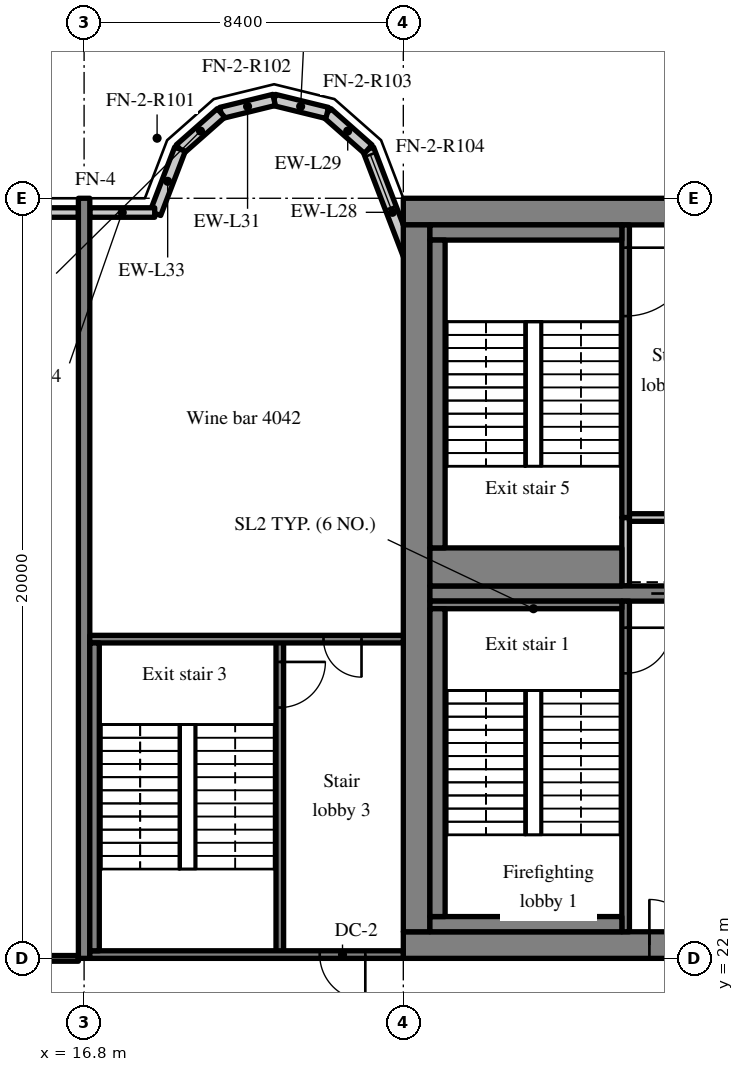
"""IFC4 building model, lengths in metres.
Left out: names, types, materials, properties, quantities, classifications, styles, units other than length and angle.
Written with IfcOpenShell. Run it as: python <this file> out.ifc"""

import sys

from ifc_helpers import new_model, si_unit, direction, frame, frame_2d, origin, place, context, subcontext, project, spatial, rectangle, extrude, source, transform, mapped, element, fill, save


model = new_model("IFC4")
c1 = context("Model", 3, precision=1e-05, world=origin(), true_north=direction((0.0, 1.0)))
c2 = subcontext(c1, "Body", "Model", "MODEL_VIEW")
j1 = project(units=[si_unit("LENGTHUNIT", "METRE"), si_unit("PLANEANGLEUNIT", "RADIAN")], contexts=[c1])
p1 = place(None, origin())
s1 = spatial("IfcSite", under=j1, at=p1, CompositionType="ELEMENT")
p2 = place(p1, origin())
s2 = spatial("IfcBuilding", under=s1, at=p2, CompositionType="ELEMENT")
p3 = place(p2, frame((0.0, 0.0, 166.8)))
s3 = spatial("IfcBuildingStorey", under=s2, at=p3, CompositionType="ELEMENT", Elevation=166.8)
m1 = source(origin(), c2, "Body", "SweptSolid", [
    extrude(rectangle(XDim=50.4, YDim=0.7, at=frame_2d((25.2, 0.0))), origin(), (0.0, 0.0, 1.0), 3.52),
])
p4 = place(p3, frame((25.2, 22.35, 0.0), z_axis=(0.0, 0.0, 1.0), x_axis=(1.0, 0.0, 0.0)))
e1 = element("IfcWall", 1, at=p4, inside=s3, PredefinedType="SHEAR", context=c2, shape_type="MappedRepresentation", body=[
    mapped(m1, transform((0.0, 0.0, 0.0), scale=1.0)),
])
m2 = source(origin(), c2, "Body", "SweptSolid", [
    extrude(rectangle(XDim=1.8, YDim=2.1, at=frame_2d((0.9, 1.05))), frame((0.0, 0.36, 0.0), z_axis=(0.0, -1.0, 0.0), x_axis=(1.0, 0.0, 0.0)), (0.0, 0.0, 1.0), 0.72),
])
p5 = place(p4, frame((15.9, 0.0, 0.0)))
e2 = element("IfcOpeningElement", 2, at=p5, cuts=e1, PredefinedType="OPENING", context=c2, shape_type="MappedRepresentation", body=[
    mapped(m2, transform((0.0, 0.0, 0.0), scale=1.0)),
])
m3 = source(origin(), c2, "Body", "SweptSolid", [
    extrude(rectangle(XDim=0.9, YDim=2.1, at=frame_2d((0.45, 1.05))), frame((0.0, 0.36, 0.0), z_axis=(0.0, -1.0, 0.0), x_axis=(1.0, 0.0, 0.0)), (0.0, 0.0, 1.0), 0.72),
])
p6 = place(p4, frame((9.7, 0.0, 0.0)))
e3 = element("IfcOpeningElement", 3, at=p6, cuts=e1, PredefinedType="OPENING", context=c2, shape_type="MappedRepresentation", body=[
    mapped(m3, transform((0.0, 0.0, 0.0), scale=1.0)),
])
p7 = place(p4, frame((21.5, 0.0, 0.0)))
e4 = element("IfcOpeningElement", 4, at=p7, cuts=e1, PredefinedType="OPENING", context=c2, shape_type="MappedRepresentation", body=[
    mapped(m3, transform((0.0, 0.0, 0.0), scale=1.0)),
])
p8 = place(p4, frame((32.7, 0.0, 0.0)))
e5 = element("IfcOpeningElement", 5, at=p8, cuts=e1, PredefinedType="OPENING", context=c2, shape_type="MappedRepresentation", body=[
    mapped(m2, transform((0.0, 0.0, 0.0), scale=1.0)),
])
m4 = source(origin(), c2, "Body", "SweptSolid", [
    extrude(rectangle(XDim=1.2, YDim=2.1, at=frame_2d((0.6, 1.05))), frame((0.0, 0.36, 0.0), z_axis=(0.0, -1.0, 0.0), x_axis=(1.0, 0.0, 0.0)), (0.0, 0.0, 1.0), 0.72),
])
p9 = place(p4, frame((6.475, 0.0, 0.0)))
e6 = element("IfcOpeningElement", 6, at=p9, cuts=e1, PredefinedType="OPENING", context=c2, shape_type="MappedRepresentation", body=[
    mapped(m4, transform((0.0, 0.0, 0.0), scale=1.0)),
])
p10 = place(p4, frame((47.875, 0.0, 0.0)))
e7 = element("IfcOpeningElement", 7, at=p10, cuts=e1, PredefinedType="OPENING", context=c2, shape_type="MappedRepresentation", body=[
    mapped(m4, transform((0.0, 0.0, 0.0), scale=1.0)),
])
p11 = place(p3, frame((25.2, 41.65, 0.0), z_axis=(0.0, 0.0, 1.0), x_axis=(1.0, 0.0, 0.0)))
e8 = element("IfcWall", 8, at=p11, inside=s3, PredefinedType="SHEAR", context=c2, shape_type="MappedRepresentation", body=[
    mapped(m1, transform((0.0, 0.0, 0.0), scale=1.0)),
])
m5 = source(origin(), c2, "Body", "SweptSolid", [
    extrude(rectangle(XDim=18.6, YDim=0.7, at=frame_2d((9.3, 0.0))), origin(), (0.0, 0.0, 1.0), 3.52),
])
p12 = place(p3, frame((25.55, 22.7, 0.0), z_axis=(0.0, 0.0, 1.0), x_axis=(0.0, 1.0, 0.0)))
e9 = element("IfcWall", 9, at=p12, inside=s3, PredefinedType="SHEAR", context=c2, shape_type="MappedRepresentation", body=[
    mapped(m5, transform((0.0, 0.0, 0.0), scale=1.0)),
])
m6 = source(origin(), c2, "Body", "SweptSolid", [
    extrude(rectangle(XDim=7.5, YDim=0.4, at=frame_2d((3.75, 0.0))), origin(), (0.0, 0.0, 1.0), 3.52),
])
p13 = place(p3, frame((25.9, 31.6, 0.0), z_axis=(0.0, 0.0, 1.0), x_axis=(1.0, 0.0, 0.0)))
e10 = element("IfcWall", 10, at=p13, inside=s3, PredefinedType="SHEAR", context=c2, shape_type="MappedRepresentation", body=[
    mapped(m6, transform((0.0, 0.0, 0.0), scale=1.0)),
])
m7 = source(origin(), c2, "Body", "SweptSolid", [
    extrude(rectangle(XDim=1.1, YDim=2.1, at=frame_2d((0.55, 1.05))), frame((0.0, 0.21, 0.0), z_axis=(0.0, -1.0, 0.0), x_axis=(1.0, 0.0, 0.0)), (0.0, 0.0, 1.0), 0.42),
])
p14 = place(p13, frame((5.825, 0.0, 0.0)))
e11 = element("IfcOpeningElement", 11, at=p14, cuts=e10, PredefinedType="OPENING", context=c2, shape_type="MappedRepresentation", body=[
    mapped(m7, transform((0.0, 0.0, 0.0), scale=1.0)),
])
m8 = source(origin(), c2, "Body", "SweptSolid", [
    extrude(rectangle(XDim=20.0, YDim=0.3, at=frame_2d((10.0, 0.0))), origin(), (0.0, 0.0, 1.0), 3.52),
])
p15 = place(p3, frame((16.8, 22.0, 0.0), z_axis=(0.0, 0.0, 1.0), x_axis=(0.0, 1.0, 0.0)))
e12 = element("IfcWall", 12, at=p15, inside=s3, PredefinedType="SHEAR", context=c2, shape_type="MappedRepresentation", body=[
    mapped(m8, transform((0.0, 0.0, 0.0), scale=1.0)),
])
m9 = source(origin(), c2, "Body", "SweptSolid", [
    extrude(rectangle(XDim=3.559, YDim=0.3, at=frame_2d((1.78, 0.0))), origin(), (0.0, 0.0, 1.0), 3.52),
])
p16 = place(p3, frame((25.55, 39.969, 0.0), z_axis=(0.0, 0.0, 1.0), x_axis=(-0.35779745313, 0.933799219604, 0.0)))
e13 = element("IfcWall", 13, at=p16, inside=s3, PredefinedType="SOLIDWALL", context=c2, shape_type="MappedRepresentation", body=[
    mapped(m9, transform((0.0, 0.0, 0.0), scale=1.0)),
])
m10 = source(origin(), c2, "Body", "SweptSolid", [
    extrude(rectangle(XDim=1.5, YDim=2.0, at=frame_2d((0.75, 1.0))), frame((0.0, 0.16, 0.0), z_axis=(0.0, -1.0, 0.0), x_axis=(1.0, 0.0, 0.0)), (0.0, 0.0, 1.0), 0.32),
])
p17 = place(p16, frame((1.903, 0.0, 0.9)))
e14 = element("IfcOpeningElement", 14, at=p17, cuts=e13, PredefinedType="OPENING", context=c2, shape_type="MappedRepresentation", body=[
    mapped(m10, transform((0.0, 0.0, 0.0), scale=1.0)),
])
m11 = source(origin(), c2, "Body", "SweptSolid", [
    extrude(rectangle(XDim=1.44, YDim=0.3, at=frame_2d((0.72, 0.0))), origin(), (0.0, 0.0, 1.0), 3.52),
])
p18 = place(p3, frame((24.277, 43.292, 0.0), z_axis=(0.0, 0.0, 1.0), x_axis=(-0.749649827867, 0.661834673902, 0.0)))
e15 = element("IfcWall", 15, at=p18, inside=s3, PredefinedType="SOLIDWALL", context=c2, shape_type="MappedRepresentation", body=[
    mapped(m11, transform((0.0, 0.0, 0.0), scale=1.0)),
])
m12 = source(origin(), c2, "Body", "SweptSolid", [
    extrude(rectangle(XDim=1.438, YDim=0.3, at=frame_2d((0.719, 0.0))), origin(), (0.0, 0.0, 1.0), 3.52),
])
p19 = place(p3, frame((23.197, 44.245, 0.0), z_axis=(0.0, 0.0, 1.0), x_axis=(-0.971152283879, 0.238460146601, 0.0)))
e16 = element("IfcWall", 16, at=p19, inside=s3, PredefinedType="SOLIDWALL", context=c2, shape_type="MappedRepresentation", body=[
    mapped(m12, transform((0.0, 0.0, 0.0), scale=1.0)),
])
m13 = source(origin(), c2, "Body", "SweptSolid", [
    extrude(rectangle(XDim=1.439, YDim=0.3, at=frame_2d((0.719, 0.0))), origin(), (0.0, 0.0, 1.0), 3.52),
])
p20 = place(p3, frame((21.8, 44.588, 0.0), z_axis=(0.0, 0.0, 1.0), x_axis=(-0.971161932466, -0.238420848351, 0.0)))
e17 = element("IfcWall", 17, at=p20, inside=s3, PredefinedType="SOLIDWALL", context=c2, shape_type="MappedRepresentation", body=[
    mapped(m13, transform((0.0, 0.0, 0.0), scale=1.0)),
])
m14 = source(origin(), c2, "Body", "SweptSolid", [
    extrude(rectangle(XDim=1.44, YDim=0.3, at=frame_2d((0.72, 0.0))), origin(), (0.0, 0.0, 1.0), 3.52),
])
p21 = place(p3, frame((20.403, 44.245, 0.0), z_axis=(0.0, 0.0, 1.0), x_axis=(-0.74957555648, -0.661918790432, 0.0)))
e18 = element("IfcWall", 18, at=p21, inside=s3, PredefinedType="SOLIDWALL", context=c2, shape_type="MappedRepresentation", body=[
    mapped(m14, transform((0.0, 0.0, 0.0), scale=1.0)),
])
m15 = source(origin(), c2, "Body", "SweptSolid", [
    extrude(rectangle(XDim=1.812, YDim=0.3, at=frame_2d((0.906, 0.0))), origin(), (0.0, 0.0, 1.0), 3.52),
])
p22 = place(p3, frame((19.323, 43.292, 0.0), z_axis=(0.0, 0.0, 1.0), x_axis=(-0.357877270961, -0.93376863244, 0.0)))
e19 = element("IfcWall", 19, at=p22, inside=s3, PredefinedType="SOLIDWALL", context=c2, shape_type="MappedRepresentation", body=[
    mapped(m15, transform((0.0, 0.0, 0.0), scale=1.0)),
])
m16 = source(origin(), c2, "Body", "SweptSolid", [
    extrude(rectangle(XDim=4.094, YDim=0.25, at=frame_2d((2.047, 0.0))), origin(), (0.0, 0.0, 1.0), 2.87),
])
p23 = place(p3, frame((16.65, 41.625, 0.0), z_axis=(0.0, 0.0, 1.0), x_axis=(-1.0, 0.0, 0.0)))
e20 = element("IfcWall", 20, at=p23, inside=s3, PredefinedType="SOLIDWALL", context=c2, shape_type="MappedRepresentation", body=[
    mapped(m16, transform((0.0, 0.0, 0.0), scale=1.0)),
])
m17 = source(origin(), c2, "Body", "SweptSolid", [
    extrude(rectangle(XDim=1.5, YDim=1.5, at=frame_2d((0.75, 0.75))), frame((0.0, 0.135, 0.0), z_axis=(0.0, -1.0, 0.0), x_axis=(1.0, 0.0, 0.0)), (0.0, 0.0, 1.0), 0.27),
])
p24 = place(p23, frame((1.297, 0.0, 0.9)))
e21 = element("IfcOpeningElement", 21, at=p24, cuts=e20, PredefinedType="OPENING", context=c2, shape_type="MappedRepresentation", body=[
    mapped(m17, transform((0.0, 0.0, 0.0), scale=1.0)),
])
m18 = source(origin(), c2, "Body", "SweptSolid", [
    extrude(rectangle(XDim=1.708, YDim=0.25, at=frame_2d((0.854, 0.0))), origin(), (0.0, 0.0, 1.0), 2.87),
])
p25 = place(p3, frame((18.658, 41.625, 0.0), z_axis=(0.0, 0.0, 1.0), x_axis=(-1.0, 0.0, 0.0)))
e22 = element("IfcWall", 22, at=p25, inside=s3, PredefinedType="SOLIDWALL", context=c2, shape_type="MappedRepresentation", body=[
    mapped(m18, transform((0.0, 0.0, 0.0), scale=1.0)),
])
m19 = source(origin(), c2, "Body", "SweptSolid", [
    extrude(rectangle(XDim=8.7, YDim=0.2, at=frame_2d((4.35, 0.0))), origin(), (0.0, 0.0, 1.0), 3.52),
])
p26 = place(p3, frame((31.05, 22.7, 0.0), z_axis=(0.0, 0.0, 1.0), x_axis=(0.0, 1.0, 0.0)))
e23 = element("IfcWall", 23, at=p26, inside=s3, PredefinedType="SOLIDWALL", context=c2, shape_type="MappedRepresentation", body=[
    mapped(m19, transform((0.0, 0.0, 0.0), scale=1.0)),
])
m20 = source(origin(), c2, "Body", "SweptSolid", [
    extrude(rectangle(XDim=1.2, YDim=2.1, at=frame_2d((0.6, 1.05))), frame((0.0, 0.11, 0.0), z_axis=(0.0, -1.0, 0.0), x_axis=(1.0, 0.0, 0.0)), (0.0, 0.0, 1.0), 0.22),
])
p27 = place(p26, frame((6.8, 0.0, 0.0)))
e24 = element("IfcOpeningElement", 24, at=p27, cuts=e23, PredefinedType="OPENING", context=c2, shape_type="MappedRepresentation", body=[
    mapped(m20, transform((0.0, 0.0, 0.0), scale=1.0)),
])
m21 = source(origin(), c2, "Body", "SweptSolid", [
    extrude(rectangle(XDim=1.8, YDim=0.2, at=frame_2d((0.9, 0.0))), origin(), (0.0, 0.0, 1.0), 3.52),
])
p28 = place(p3, frame((31.05, 31.8, 0.0), z_axis=(0.0, 0.0, 1.0), x_axis=(0.0, 1.0, 0.0)))
e25 = element("IfcWall", 25, at=p28, inside=s3, PredefinedType="SOLIDWALL", context=c2, shape_type="MappedRepresentation", body=[
    mapped(m21, transform((0.0, 0.0, 0.0), scale=1.0)),
])
m22 = source(origin(), c2, "Body", "SweptSolid", [
    extrude(rectangle(XDim=2.25, YDim=0.2, at=frame_2d((1.125, 0.0))), origin(), (0.0, 0.0, 1.0), 3.52),
])
p29 = place(p3, frame((31.15, 33.6, 0.0), z_axis=(0.0, 0.0, 1.0), x_axis=(1.0, 0.0, 0.0)))
e26 = element("IfcWall", 26, at=p29, inside=s3, PredefinedType="SOLIDWALL", context=c2, shape_type="MappedRepresentation", body=[
    mapped(m22, transform((0.0, 0.0, 0.0), scale=1.0)),
])
m23 = source(origin(), c2, "Body", "SweptSolid", [
    extrude(rectangle(XDim=7.7, YDim=0.2, at=frame_2d((3.85, 0.0))), origin(), (0.0, 0.0, 1.0), 3.52),
])
p30 = place(p3, frame((31.05, 33.6, 0.0), z_axis=(0.0, 0.0, 1.0), x_axis=(0.0, 1.0, 0.0)))
e27 = element("IfcWall", 27, at=p30, inside=s3, PredefinedType="SOLIDWALL", context=c2, shape_type="MappedRepresentation", body=[
    mapped(m23, transform((0.0, 0.0, 0.0), scale=1.0)),
])
m24 = source(origin(), c2, "Body", "SweptSolid", [
    extrude(rectangle(XDim=1.8, YDim=2.1, at=frame_2d((0.9, 1.05))), frame((0.0, 0.11, 0.0), z_axis=(0.0, -1.0, 0.0), x_axis=(1.0, 0.0, 0.0)), (0.0, 0.0, 1.0), 0.22),
])
p31 = place(p30, frame((5.3, 0.0, 0.0)))
e28 = element("IfcOpeningElement", 28, at=p31, cuts=e27, PredefinedType="OPENING", context=c2, shape_type="MappedRepresentation", body=[
    mapped(m24, transform((0.0, 0.0, 0.0), scale=1.0)),
])
m25 = source(origin(), c2, "Body", "SweptSolid", [
    extrude(rectangle(XDim=8.3, YDim=0.2, at=frame_2d((4.15, 0.0))), origin(), (0.0, 0.0, 1.0), 3.52),
])
p32 = place(p3, frame((21.95, 22.1, 0.0), z_axis=(0.0, 0.0, 1.0), x_axis=(0.0, 1.0, 0.0)))
e29 = element("IfcWall", 29, at=p32, inside=s3, PredefinedType="SOLIDWALL", context=c2, shape_type="MappedRepresentation", body=[
    mapped(m25, transform((0.0, 0.0, 0.0), scale=1.0)),
])
p33 = place(p32, frame((6.5, 0.0, 0.0)))
e30 = element("IfcOpeningElement", 30, at=p33, cuts=e29, PredefinedType="OPENING", context=c2, shape_type="MappedRepresentation", body=[
    mapped(m20, transform((0.0, 0.0, 0.0), scale=1.0)),
])
m26 = source(origin(), c2, "Body", "SweptSolid", [
    extrude(rectangle(XDim=8.25, YDim=0.2, at=frame_2d((4.125, 0.0))), origin(), (0.0, 0.0, 1.0), 3.52),
])
p34 = place(p3, frame((16.95, 22.1, 0.0), z_axis=(0.0, 0.0, 1.0), x_axis=(1.0, 0.0, 0.0)))
e31 = element("IfcWall", 31, at=p34, inside=s3, PredefinedType="SOLIDWALL", context=c2, shape_type="MappedRepresentation", body=[
    mapped(m26, transform((0.0, 0.0, 0.0), scale=1.0)),
])
p35 = place(p34, frame((6.05, 0.0, 0.0)))
e32 = element("IfcOpeningElement", 32, at=p35, cuts=e31, PredefinedType="OPENING", context=c2, shape_type="MappedRepresentation", body=[
    mapped(m20, transform((0.0, 0.0, 0.0), scale=1.0)),
])
p36 = place(p3, frame((16.95, 30.4, 0.0), z_axis=(0.0, 0.0, 1.0), x_axis=(1.0, 0.0, 0.0)))
e33 = element("IfcWall", 33, at=p36, inside=s3, PredefinedType="SOLIDWALL", context=c2, shape_type="MappedRepresentation", body=[
    mapped(m26, transform((0.0, 0.0, 0.0), scale=1.0)),
])
m27 = source(origin(), c2, "Body", "SweptSolid", [
    extrude(rectangle(XDim=1.0, YDim=2.1, at=frame_2d((0.5, 1.05))), frame((0.0, 0.11, 0.0), z_axis=(0.0, -1.0, 0.0), x_axis=(1.0, 0.0, 0.0)), (0.0, 0.0, 1.0), 0.22),
])
p37 = place(p36, frame((6.15, 0.0, 0.0)))
e34 = element("IfcOpeningElement", 34, at=p37, cuts=e33, PredefinedType="OPENING", context=c2, shape_type="MappedRepresentation", body=[
    mapped(m27, transform((0.0, 0.0, 0.0), scale=1.0)),
])
m28 = source(origin(), c2, "Body", "SweptSolid", [
    extrude(rectangle(XDim=5.05, YDim=0.4, at=frame_2d((2.525, 0.0))), origin(), (0.0, 0.0, 1.0), 3.52),
])
p38 = place(p3, frame((25.9, 22.9, 0.0), z_axis=(0.0, 0.0, 1.0), x_axis=(1.0, 0.0, 0.0)))
e35 = element("IfcWall", 35, at=p38, inside=s3, PredefinedType="SOLIDWALL", context=c2, shape_type="MappedRepresentation", body=[
    mapped(m28, transform((0.0, 0.0, 0.0), scale=1.0)),
])
m29 = source(origin(), c2, "Body", "SweptSolid", [
    extrude(rectangle(XDim=5.05, YDim=0.2, at=frame_2d((2.525, 0.0))), origin(), (0.0, 0.0, 1.0), 3.52),
])
p39 = place(p3, frame((25.9, 31.3, 0.0), z_axis=(0.0, 0.0, 1.0), x_axis=(1.0, 0.0, 0.0)))
e36 = element("IfcWall", 36, at=p39, inside=s3, PredefinedType="SOLIDWALL", context=c2, shape_type="MappedRepresentation", body=[
    mapped(m29, transform((0.0, 0.0, 0.0), scale=1.0)),
])
m30 = source(origin(), c2, "Body", "SweptSolid", [
    extrude(rectangle(XDim=8.1, YDim=0.4, at=frame_2d((4.05, 0.0))), origin(), (0.0, 0.0, 1.0), 3.52),
])
p40 = place(p3, frame((26.1, 23.1, 0.0), z_axis=(0.0, 0.0, 1.0), x_axis=(0.0, 1.0, 0.0)))
e37 = element("IfcWall", 37, at=p40, inside=s3, PredefinedType="SOLIDWALL", context=c2, shape_type="MappedRepresentation", body=[
    mapped(m30, transform((0.0, 0.0, 0.0), scale=1.0)),
])
m31 = source(origin(), c2, "Body", "SweptSolid", [
    extrude(rectangle(XDim=8.1, YDim=0.25, at=frame_2d((4.05, 0.0))), origin(), (0.0, 0.0, 1.0), 3.52),
])
p41 = place(p3, frame((17.075, 22.2, 0.0), z_axis=(0.0, 0.0, 1.0), x_axis=(0.0, 1.0, 0.0)))
e38 = element("IfcWall", 38, at=p41, inside=s3, PredefinedType="SOLIDWALL", context=c2, shape_type="MappedRepresentation", body=[
    mapped(m31, transform((0.0, 0.0, 0.0), scale=1.0)),
])
p42 = place(p3, frame((25.9, 41.1, 0.0), z_axis=(0.0, 0.0, 1.0), x_axis=(1.0, 0.0, 0.0)))
e39 = element("IfcWall", 39, at=p42, inside=s3, PredefinedType="SOLIDWALL", context=c2, shape_type="MappedRepresentation", body=[
    mapped(m28, transform((0.0, 0.0, 0.0), scale=1.0)),
])
m32 = source(origin(), c2, "Body", "SweptSolid", [
    extrude(rectangle(XDim=5.05, YDim=1.0, at=frame_2d((2.525, 0.0))), origin(), (0.0, 0.0, 1.0), 3.52),
])
p43 = place(p3, frame((25.9, 32.3, 0.0), z_axis=(0.0, 0.0, 1.0), x_axis=(1.0, 0.0, 0.0)))
e40 = element("IfcWall", 40, at=p43, inside=s3, PredefinedType="SOLIDWALL", context=c2, shape_type="MappedRepresentation", body=[
    mapped(m32, transform((0.0, 0.0, 0.0), scale=1.0)),
])
p44 = place(p3, frame((26.1, 32.8, 0.0), z_axis=(0.0, 0.0, 1.0), x_axis=(0.0, 1.0, 0.0)))
e41 = element("IfcWall", 41, at=p44, inside=s3, PredefinedType="SOLIDWALL", context=c2, shape_type="MappedRepresentation", body=[
    mapped(m30, transform((0.0, 0.0, 0.0), scale=1.0)),
])
m33 = source(origin(), c2, "Body", "SweptSolid", [
    extrude(rectangle(XDim=7.95, YDim=0.15, at=frame_2d((3.975, 0.0))), origin(), (0.0, 0.0, 1.0), 2.82),
])
p45 = place(p3, frame((8.7, 22.0, 0.0), z_axis=(0.0, 0.0, 1.0), x_axis=(1.0, 0.0, 0.0)))
e42 = element("IfcWall", 42, at=p45, inside=s3, PredefinedType="PARTITIONING", context=c2, shape_type="MappedRepresentation", body=[
    mapped(m33, transform((0.0, 0.0, 0.0), scale=1.0)),
])
m34 = source(origin(), c2, "Body", "SweptSolid", [
    extrude(rectangle(XDim=1.8, YDim=2.1, at=frame_2d((0.9, 1.05))), frame((0.0, 0.085, 0.0), z_axis=(0.0, -1.0, 0.0), x_axis=(1.0, 0.0, 0.0)), (0.0, 0.0, 1.0), 0.17),
])
p46 = place(p45, frame((3.075, 0.0, 0.0)))
e43 = element("IfcOpeningElement", 43, at=p46, cuts=e42, PredefinedType="OPENING", context=c2, shape_type="MappedRepresentation", body=[
    mapped(m34, transform((0.0, 0.0, 0.0), scale=1.0)),
])
m35 = source(origin(), c2, "Body", "SweptSolid", [
    extrude(rectangle(XDim=1.5, YDim=2.0, at=frame_2d((0.75, 1.0))), frame((0.0, 0.03, 0.0), z_axis=(0.0, -1.0, 0.0), x_axis=(1.0, 0.0, 0.0)), (0.0, 0.0, 1.0), 0.06),
])
p47 = place(p17, origin())
e44 = element("IfcWindow", 44, at=p47, inside=s3, PartitioningType="SINGLE_PANEL", PredefinedType="WINDOW", context=c2, shape_type="MappedRepresentation", body=[
    mapped(m35, transform((0.0, 0.0, 0.0), scale=1.0)),
])
fill(e14, e44)
m36 = source(origin(), c2, "Body", "SweptSolid", [
    extrude(rectangle(XDim=1.2, YDim=2.1, at=frame_2d((0.6, 1.05))), frame((0.0, 0.025, 0.0), z_axis=(0.0, -1.0, 0.0), x_axis=(1.0, 0.0, 0.0)), (0.0, 0.0, 1.0), 0.05),
])
p48 = place(p27, origin())
e45 = element("IfcDoor", 45, at=p48, inside=s3, OperationType="SINGLE_SWING_RIGHT", PredefinedType="DOOR", context=c2, shape_type="MappedRepresentation", body=[
    mapped(m36, transform((0.0, 0.0, 0.0), scale=1.0)),
])
fill(e24, e45)
m37 = source(origin(), c2, "Body", "SweptSolid", [
    extrude(rectangle(XDim=1.2, YDim=2.1, at=frame_2d((0.6, 1.05))), frame((0.0, 0.275, 0.0), z_axis=(0.0, -1.0, 0.0), x_axis=(1.0, 0.0, 0.0)), (0.0, 0.0, 1.0), 0.05),
])
p49 = place(p9, origin())
e46 = element("IfcDoor", 46, at=p49, inside=s3, OperationType="SINGLE_SWING_LEFT", PredefinedType="DOOR", context=c2, shape_type="MappedRepresentation", body=[
    mapped(m37, transform((0.0, 0.0, 0.0), scale=1.0)),
])
fill(e6, e46)
m38 = source(origin(), c2, "Body", "SweptSolid", [
    extrude(rectangle(XDim=1.1, YDim=2.1, at=frame_2d((0.55, 1.05))), frame((0.0, 0.025, 0.0), z_axis=(0.0, -1.0, 0.0), x_axis=(1.0, 0.0, 0.0)), (0.0, 0.0, 1.0), 0.05),
])
p50 = place(p14, origin())
e47 = element("IfcDoor", 47, at=p50, inside=s3, OperationType="SLIDING_TO_LEFT", PredefinedType="DOOR", context=c2, shape_type="MappedRepresentation", body=[
    mapped(m38, transform((0.0, 0.0, 0.0), scale=1.0)),
])
fill(e11, e47)
m39 = source(origin(), c2, "Body", "SweptSolid", [
    extrude(rectangle(XDim=1.8, YDim=2.1, at=frame_2d((0.9, 1.05))), frame((0.0, 0.025, 0.0), z_axis=(0.0, -1.0, 0.0), x_axis=(1.0, 0.0, 0.0)), (0.0, 0.0, 1.0), 0.05),
])
p51 = place(p31, origin())
e48 = element("IfcDoor", 48, at=p51, inside=s3, OperationType="SINGLE_SWING_RIGHT", PredefinedType="DOOR", context=c2, shape_type="MappedRepresentation", body=[
    mapped(m39, transform((0.0, 0.0, 0.0), scale=1.0)),
])
fill(e28, e48)
p52 = place(p33, origin())
e49 = element("IfcDoor", 49, at=p52, inside=s3, OperationType="SINGLE_SWING_RIGHT", PredefinedType="DOOR", context=c2, shape_type="MappedRepresentation", body=[
    mapped(m36, transform((0.0, 0.0, 0.0), scale=1.0)),
])
fill(e30, e49)
p53 = place(p35, origin())
e50 = element("IfcDoor", 50, at=p53, inside=s3, OperationType="SINGLE_SWING_RIGHT", PredefinedType="DOOR", context=c2, shape_type="MappedRepresentation", body=[
    mapped(m36, transform((0.0, 0.0, 0.0), scale=1.0)),
])
fill(e32, e50)
m40 = source(origin(), c2, "Body", "SweptSolid", [
    extrude(rectangle(XDim=1.0, YDim=2.1, at=frame_2d((0.5, 1.05))), frame((0.0, 0.025, 0.0), z_axis=(0.0, -1.0, 0.0), x_axis=(1.0, 0.0, 0.0)), (0.0, 0.0, 1.0), 0.05),
])
p54 = place(p37, origin())
e51 = element("IfcDoor", 51, at=p54, inside=s3, OperationType="SINGLE_SWING_RIGHT", PredefinedType="DOOR", context=c2, shape_type="MappedRepresentation", body=[
    mapped(m40, transform((0.0, 0.0, 0.0), scale=1.0)),
])
fill(e34, e51)
save(model, sys.argv[1])
